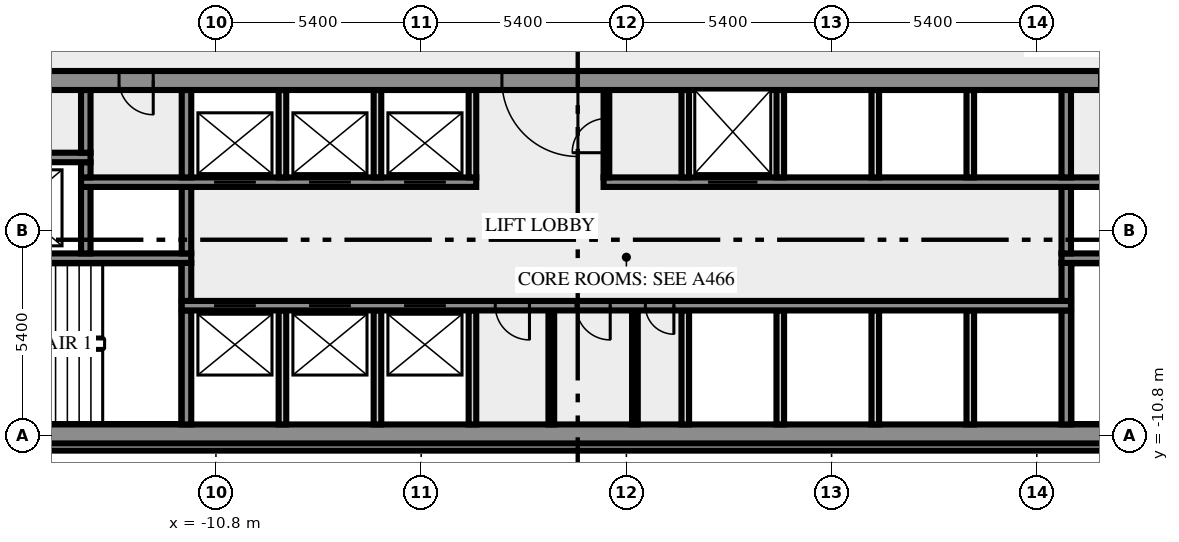
"""IFC4 building model, lengths in metres.
Left out: names, types, materials, properties, quantities, classifications, styles, units other than length and angle.
Written with IfcOpenShell. Run it as: python <this file> out.ifc"""

import sys

from ifc_helpers import new_model, si_unit, direction, frame, frame_2d, origin, place, context, subcontext, project, spatial, rectangle, extrude, element, fill, save


model = new_model("IFC4")
c1 = context("Model", 3, precision=1e-05, world=origin(), true_north=direction((0.0, 1.0)))
c2 = subcontext(c1, "Body", "Model", "MODEL_VIEW")
j1 = project(units=[si_unit("LENGTHUNIT", "METRE"), si_unit("PLANEANGLEUNIT", "RADIAN")], contexts=[c1])
p1 = place(None, origin())
s1 = spatial("IfcSite", under=j1, at=p1, CompositionType="ELEMENT")
p2 = place(p1, origin())
s2 = spatial("IfcBuilding", under=s1, at=p2, CompositionType="ELEMENT")
p3 = place(p2, frame((0.0, 0.0, 93.0)))
s3 = spatial("IfcBuildingStorey", under=s2, at=p3, CompositionType="ELEMENT", Elevation=93.0)
p4 = place(p3, frame((-17.444, -11.088, 0.0), z_axis=(0.0, 0.0, 1.0), x_axis=(1.0, 0.0, 0.0)))
e1 = element("IfcWall", 1, at=p4, inside=s3, PredefinedType="SOLIDWALL", context=c2, shape_type="SweptSolid", body=[
    extrude(rectangle(XDim=34.888, YDim=0.2, at=frame_2d((17.444, 0.0))), origin(), (0.0, 0.0, 1.0), 3.65),
])
p5 = place(p3, frame((-20.0, -10.75, 0.0), z_axis=(0.0, 0.0, 1.0), x_axis=(1.0, 0.0, 0.0)))
e2 = element("IfcWall", 2, at=p5, inside=s3, PredefinedType="SHEAR", context=c2, shape_type="SweptSolid", body=[
    extrude(rectangle(XDim=40.0, YDim=0.5, at=frame_2d((20.0, 0.0))), origin(), (0.0, 0.0, 1.0), 3.65),
])
p6 = place(p5, frame((0.8, 0.0, 1.0)))
e3 = element("IfcOpeningElement", 3, at=p6, cuts=e2, PredefinedType="OPENING", context=c2, shape_type="SweptSolid", body=[
    extrude(rectangle(XDim=1.2, YDim=1.2, at=frame_2d((0.6, 0.6))), frame((0.0, 0.26, 0.0), z_axis=(0.0, -1.0, 0.0), x_axis=(1.0, 0.0, 0.0)), (0.0, 0.0, 1.0), 0.52),
])
p7 = place(p5, frame((38.0, 0.0, 1.0)))
e4 = element("IfcOpeningElement", 4, at=p7, cuts=e2, PredefinedType="OPENING", context=c2, shape_type="SweptSolid", body=[
    extrude(rectangle(XDim=1.2, YDim=1.2, at=frame_2d((0.6, 0.6))), frame((0.0, 0.26, 0.0), z_axis=(0.0, -1.0, 0.0), x_axis=(1.0, 0.0, 0.0)), (0.0, 0.0, 1.0), 0.52),
])
p8 = place(p3, frame((-11.575, -10.5, 0.0), z_axis=(0.0, 0.0, 1.0), x_axis=(0.0, 1.0, 0.0)))
e5 = element("IfcWall", 5, at=p8, inside=s3, PredefinedType="SHEAR", context=c2, shape_type="SweptSolid", body=[
    extrude(rectangle(XDim=3.0, YDim=0.25, at=frame_2d((1.5, 0.0))), origin(), (0.0, 0.0, 1.0), 3.65),
])
for number, where, z_axis, x_axis in (
    (6, (-9.05, -10.5, 0.0), (0.0, 0.0, 1.0), (0.0, 1.0, 0.0)),
    (7, (-6.55, -10.5, 0.0), (0.0, 0.0, 1.0), (0.0, 1.0, 0.0)),
    (8, (-4.05, -10.5, 0.0), (0.0, 0.0, 1.0), (0.0, 1.0, 0.0)),
):
    element("IfcWall", number, at=place(p3, frame(where, z_axis=z_axis, x_axis=x_axis)), inside=s3, PredefinedType="SOLIDWALL", context=c2, shape_type="SweptSolid", body=[
        extrude(rectangle(XDim=3.0, YDim=0.2, at=frame_2d((1.5, 0.0))), origin(), (0.0, 0.0, 1.0), 3.65),
    ])
for number, where, z_axis, x_axis in (
    (9, (-1.975, -10.5, 0.0), (0.0, 0.0, 1.0), (0.0, 1.0, 0.0)),
    (10, (0.225, -10.5, 0.0), (0.0, 0.0, 1.0), (0.0, 1.0, 0.0)),
):
    element("IfcWall", number, at=place(p3, frame(where, z_axis=z_axis, x_axis=x_axis)), inside=s3, PredefinedType="PARTITIONING", context=c2, shape_type="SweptSolid", body=[
        extrude(rectangle(XDim=3.0, YDim=0.15, at=frame_2d((1.5, 0.0))), origin(), (0.0, 0.0, 1.0), 3.65),
    ])
for number, where, z_axis, x_axis in (
    (11, (1.55, -10.5, 0.0), (0.0, 0.0, 1.0), (0.0, 1.0, 0.0)),
    (12, (4.05, -10.5, 0.0), (0.0, 0.0, 1.0), (0.0, 1.0, 0.0)),
    (13, (6.55, -10.5, 0.0), (0.0, 0.0, 1.0), (0.0, 1.0, 0.0)),
    (14, (9.05, -10.5, 0.0), (0.0, 0.0, 1.0), (0.0, 1.0, 0.0)),
):
    element("IfcWall", number, at=place(p3, frame(where, z_axis=z_axis, x_axis=x_axis)), inside=s3, PredefinedType="SOLIDWALL", context=c2, shape_type="SweptSolid", body=[
        extrude(rectangle(XDim=3.0, YDim=0.2, at=frame_2d((1.5, 0.0))), origin(), (0.0, 0.0, 1.0), 3.65),
    ])
p9 = place(p3, frame((11.575, -10.5, 0.0), z_axis=(0.0, 0.0, 1.0), x_axis=(0.0, 1.0, 0.0)))
e15 = element("IfcWall", 15, at=p9, inside=s3, PredefinedType="SHEAR", context=c2, shape_type="SweptSolid", body=[
    extrude(rectangle(XDim=3.0, YDim=0.25, at=frame_2d((1.5, 0.0))), origin(), (0.0, 0.0, 1.0), 3.65),
])
p10 = place(p3, frame((11.7, -7.375, 0.0), z_axis=(0.0, 0.0, 1.0), x_axis=(-1.0, 0.0, 0.0)))
e16 = element("IfcWall", 16, at=p10, inside=s3, PredefinedType="SHEAR", context=c2, shape_type="SweptSolid", body=[
    extrude(rectangle(XDim=23.4, YDim=0.25, at=frame_2d((11.7, 0.0))), origin(), (0.0, 0.0, 1.0), 3.65),
])
p11 = place(p10, frame((21.45, 0.0, 0.0)))
e17 = element("IfcOpeningElement", 17, at=p11, cuts=e16, PredefinedType="OPENING", context=c2, shape_type="SweptSolid", body=[
    extrude(rectangle(XDim=1.1, YDim=2.1, at=frame_2d((0.55, 1.05))), frame((0.0, 0.135, 0.0), z_axis=(0.0, -1.0, 0.0), x_axis=(1.0, 0.0, 0.0)), (0.0, 0.0, 1.0), 0.27),
])
p12 = place(p10, frame((18.95, 0.0, 0.0)))
e18 = element("IfcOpeningElement", 18, at=p12, cuts=e16, PredefinedType="OPENING", context=c2, shape_type="SweptSolid", body=[
    extrude(rectangle(XDim=1.1, YDim=2.1, at=frame_2d((0.55, 1.05))), frame((0.0, 0.135, 0.0), z_axis=(0.0, -1.0, 0.0), x_axis=(1.0, 0.0, 0.0)), (0.0, 0.0, 1.0), 0.27),
])
p13 = place(p10, frame((16.45, 0.0, 0.0)))
e19 = element("IfcOpeningElement", 19, at=p13, cuts=e16, PredefinedType="OPENING", context=c2, shape_type="SweptSolid", body=[
    extrude(rectangle(XDim=1.1, YDim=2.1, at=frame_2d((0.55, 1.05))), frame((0.0, 0.135, 0.0), z_axis=(0.0, -1.0, 0.0), x_axis=(1.0, 0.0, 0.0)), (0.0, 0.0, 1.0), 0.27),
])
p14 = place(p10, frame((14.25, 0.0, 0.0)))
e20 = element("IfcOpeningElement", 20, at=p14, cuts=e16, PredefinedType="OPENING", context=c2, shape_type="SweptSolid", body=[
    extrude(rectangle(XDim=0.9, YDim=2.1, at=frame_2d((0.45, 1.05))), frame((0.0, 0.135, 0.0), z_axis=(0.0, -1.0, 0.0), x_axis=(1.0, 0.0, 0.0)), (0.0, 0.0, 1.0), 0.27),
])
p15 = place(p10, frame((12.125, 0.0, 0.0)))
e21 = element("IfcOpeningElement", 21, at=p15, cuts=e16, PredefinedType="OPENING", context=c2, shape_type="SweptSolid", body=[
    extrude(rectangle(XDim=0.9, YDim=2.1, at=frame_2d((0.45, 1.05))), frame((0.0, 0.135, 0.0), z_axis=(0.0, -1.0, 0.0), x_axis=(1.0, 0.0, 0.0)), (0.0, 0.0, 1.0), 0.27),
])
p16 = place(p10, frame((10.45, 0.0, 0.0)))
e22 = element("IfcOpeningElement", 22, at=p16, cuts=e16, PredefinedType="OPENING", context=c2, shape_type="SweptSolid", body=[
    extrude(rectangle(XDim=0.75, YDim=2.1, at=frame_2d((0.375, 1.05))), frame((0.0, 0.135, 0.0), z_axis=(0.0, -1.0, 0.0), x_axis=(1.0, 0.0, 0.0)), (0.0, 0.0, 1.0), 0.27),
])
for number, where, z_axis, x_axis in (
    (23, (-11.575, -7.25, 0.0), (0.0, 0.0, 1.0), (0.0, 1.0, 0.0)),
    (24, (11.575, -7.25, 0.0), (0.0, 0.0, 1.0), (0.0, 1.0, 0.0)),
):
    element("IfcWall", number, at=place(p3, frame(where, z_axis=z_axis, x_axis=x_axis)), inside=s3, PredefinedType="SHEAR", context=c2, shape_type="SweptSolid", body=[
        extrude(rectangle(XDim=1.0, YDim=0.25, at=frame_2d((0.5, 0.0))), origin(), (0.0, 0.0, 1.0), 3.65),
    ])
p17 = place(p3, frame((-11.45, -6.125, 0.0), z_axis=(0.0, 0.0, 1.0), x_axis=(-1.0, 0.0, 0.0)))
e25 = element("IfcWall", 25, at=p17, inside=s3, PredefinedType="SHEAR", context=c2, shape_type="SweptSolid", body=[
    extrude(rectangle(XDim=8.05, YDim=0.25, at=frame_2d((4.025, 0.0))), origin(), (0.0, 0.0, 1.0), 3.65),
])
p18 = place(p17, frame((6.2, 0.0, 0.0)))
e26 = element("IfcOpeningElement", 26, at=p18, cuts=e25, PredefinedType="OPENING", context=c2, shape_type="SweptSolid", body=[
    extrude(rectangle(XDim=1.8, YDim=2.1, at=frame_2d((0.9, 1.05))), frame((0.0, 0.135, 0.0), z_axis=(0.0, -1.0, 0.0), x_axis=(1.0, 0.0, 0.0)), (0.0, 0.0, 1.0), 0.27),
])
p19 = place(p3, frame((19.5, -6.125, 0.0), z_axis=(0.0, 0.0, 1.0), x_axis=(-1.0, 0.0, 0.0)))
e27 = element("IfcWall", 27, at=p19, inside=s3, PredefinedType="SHEAR", context=c2, shape_type="SweptSolid", body=[
    extrude(rectangle(XDim=8.05, YDim=0.25, at=frame_2d((4.025, 0.0))), origin(), (0.0, 0.0, 1.0), 3.65),
])
p20 = place(p19, frame((0.05, 0.0, 0.0)))
e28 = element("IfcOpeningElement", 28, at=p20, cuts=e27, PredefinedType="OPENING", context=c2, shape_type="SweptSolid", body=[
    extrude(rectangle(XDim=1.8, YDim=2.1, at=frame_2d((0.9, 1.05))), frame((0.0, 0.135, 0.0), z_axis=(0.0, -1.0, 0.0), x_axis=(1.0, 0.0, 0.0)), (0.0, 0.0, 1.0), 0.27),
])
for number, where, z_axis, x_axis in (
    (29, (-14.225, -6.0, 0.0), (0.0, 0.0, 1.0), (0.0, 1.0, 0.0)),
    (30, (-11.575, -6.0, 0.0), (0.0, 0.0, 1.0), (0.0, 1.0, 0.0)),
    (31, (11.575, -6.0, 0.0), (0.0, 0.0, 1.0), (0.0, 1.0, 0.0)),
):
    element("IfcWall", number, at=place(p3, frame(where, z_axis=z_axis, x_axis=x_axis)), inside=s3, PredefinedType="SHEAR", context=c2, shape_type="SweptSolid", body=[
        extrude(rectangle(XDim=1.75, YDim=0.25, at=frame_2d((0.875, 0.0))), origin(), (0.0, 0.0, 1.0), 3.65),
    ])
p21 = place(p3, frame((-14.35, -4.125, 0.0), z_axis=(0.0, 0.0, 1.0), x_axis=(1.0, 0.0, 0.0)))
e32 = element("IfcWall", 32, at=p21, inside=s3, PredefinedType="SHEAR", context=c2, shape_type="SweptSolid", body=[
    extrude(rectangle(XDim=10.4, YDim=0.25, at=frame_2d((5.2, 0.0))), origin(), (0.0, 0.0, 1.0), 3.65),
])
p22 = place(p21, frame((3.5, 0.0, 0.0)))
e33 = element("IfcOpeningElement", 33, at=p22, cuts=e32, PredefinedType="OPENING", context=c2, shape_type="SweptSolid", body=[
    extrude(rectangle(XDim=1.1, YDim=2.1, at=frame_2d((0.55, 1.05))), frame((0.0, 0.135, 0.0), z_axis=(0.0, -1.0, 0.0), x_axis=(1.0, 0.0, 0.0)), (0.0, 0.0, 1.0), 0.27),
])
p23 = place(p21, frame((6.0, 0.0, 0.0)))
e34 = element("IfcOpeningElement", 34, at=p23, cuts=e32, PredefinedType="OPENING", context=c2, shape_type="SweptSolid", body=[
    extrude(rectangle(XDim=1.1, YDim=2.1, at=frame_2d((0.55, 1.05))), frame((0.0, 0.135, 0.0), z_axis=(0.0, -1.0, 0.0), x_axis=(1.0, 0.0, 0.0)), (0.0, 0.0, 1.0), 0.27),
])
p24 = place(p21, frame((8.5, 0.0, 0.0)))
e35 = element("IfcOpeningElement", 35, at=p24, cuts=e32, PredefinedType="OPENING", context=c2, shape_type="SweptSolid", body=[
    extrude(rectangle(XDim=1.1, YDim=2.1, at=frame_2d((0.55, 1.05))), frame((0.0, 0.135, 0.0), z_axis=(0.0, -1.0, 0.0), x_axis=(1.0, 0.0, 0.0)), (0.0, 0.0, 1.0), 0.27),
])
p25 = place(p3, frame((-0.6, -4.125, 0.0), z_axis=(0.0, 0.0, 1.0), x_axis=(1.0, 0.0, 0.0)))
e36 = element("IfcWall", 36, at=p25, inside=s3, PredefinedType="SHEAR", context=c2, shape_type="SweptSolid", body=[
    extrude(rectangle(XDim=14.95, YDim=0.25, at=frame_2d((7.475, 0.0))), origin(), (0.0, 0.0, 1.0), 3.65),
])
p26 = place(p25, frame((2.75, 0.0, 0.0)))
e37 = element("IfcOpeningElement", 37, at=p26, cuts=e36, PredefinedType="OPENING", context=c2, shape_type="SweptSolid", body=[
    extrude(rectangle(XDim=1.3, YDim=2.1, at=frame_2d((0.65, 1.05))), frame((0.0, 0.135, 0.0), z_axis=(0.0, -1.0, 0.0), x_axis=(1.0, 0.0, 0.0)), (0.0, 0.0, 1.0), 0.27),
])
p27 = place(p3, frame((-14.225, -4.0, 0.0), z_axis=(0.0, 0.0, 1.0), x_axis=(0.0, 1.0, 0.0)))
e38 = element("IfcWall", 38, at=p27, inside=s3, PredefinedType="SHEAR", context=c2, shape_type="SweptSolid", body=[
    extrude(rectangle(XDim=0.4, YDim=0.25, at=frame_2d((0.2, 0.0))), origin(), (0.0, 0.0, 1.0), 3.65),
])
p28 = place(p3, frame((-11.575, -4.0, 0.0), z_axis=(0.0, 0.0, 1.0), x_axis=(0.0, 1.0, 0.0)))
e39 = element("IfcWall", 39, at=p28, inside=s3, PredefinedType="SHEAR", context=c2, shape_type="SweptSolid", body=[
    extrude(rectangle(XDim=2.3, YDim=0.25, at=frame_2d((1.15, 0.0))), origin(), (0.0, 0.0, 1.0), 3.65),
])
for number, where, z_axis, x_axis in (
    (40, (-9.05, -4.0, 0.0), (0.0, 0.0, 1.0), (0.0, 1.0, 0.0)),
    (41, (-6.55, -4.0, 0.0), (0.0, 0.0, 1.0), (0.0, 1.0, 0.0)),
    (42, (-4.05, -4.0, 0.0), (0.0, 0.0, 1.0), (0.0, 1.0, 0.0)),
):
    element("IfcWall", number, at=place(p3, frame(where, z_axis=z_axis, x_axis=x_axis)), inside=s3, PredefinedType="SOLIDWALL", context=c2, shape_type="SweptSolid", body=[
        extrude(rectangle(XDim=2.3, YDim=0.2, at=frame_2d((1.15, 0.0))), origin(), (0.0, 0.0, 1.0), 3.65),
    ])
p29 = place(p3, frame((-0.525, -4.0, 0.0), z_axis=(0.0, 0.0, 1.0), x_axis=(0.0, 1.0, 0.0)))
e43 = element("IfcWall", 43, at=p29, inside=s3, PredefinedType="PARTITIONING", context=c2, shape_type="SweptSolid", body=[
    extrude(rectangle(XDim=2.3, YDim=0.15, at=frame_2d((1.15, 0.0))), origin(), (0.0, 0.0, 1.0), 3.65),
])
p30 = place(p29, frame((0.65, 0.0, 0.0)))
e44 = element("IfcOpeningElement", 44, at=p30, cuts=e43, PredefinedType="OPENING", context=c2, shape_type="SweptSolid", body=[
    extrude(rectangle(XDim=0.9, YDim=2.1, at=frame_2d((0.45, 1.05))), frame((0.0, 0.085, 0.0), z_axis=(0.0, -1.0, 0.0), x_axis=(1.0, 0.0, 0.0)), (0.0, 0.0, 1.0), 0.17),
])
for number, where, z_axis, x_axis in (
    (45, (1.55, -4.0, 0.0), (0.0, 0.0, 1.0), (0.0, 1.0, 0.0)),
    (46, (4.05, -4.0, 0.0), (0.0, 0.0, 1.0), (0.0, 1.0, 0.0)),
    (47, (6.55, -4.0, 0.0), (0.0, 0.0, 1.0), (0.0, 1.0, 0.0)),
    (48, (9.05, -4.0, 0.0), (0.0, 0.0, 1.0), (0.0, 1.0, 0.0)),
):
    element("IfcWall", number, at=place(p3, frame(where, z_axis=z_axis, x_axis=x_axis)), inside=s3, PredefinedType="SOLIDWALL", context=c2, shape_type="SweptSolid", body=[
        extrude(rectangle(XDim=2.3, YDim=0.2, at=frame_2d((1.15, 0.0))), origin(), (0.0, 0.0, 1.0), 3.65),
    ])
p31 = place(p3, frame((11.575, -4.0, 0.0), z_axis=(0.0, 0.0, 1.0), x_axis=(0.0, 1.0, 0.0)))
e49 = element("IfcWall", 49, at=p31, inside=s3, PredefinedType="SHEAR", context=c2, shape_type="SweptSolid", body=[
    extrude(rectangle(XDim=2.3, YDim=0.25, at=frame_2d((1.15, 0.0))), origin(), (0.0, 0.0, 1.0), 3.65),
])
p32 = place(p3, frame((-17.35, -3.475, 0.0), z_axis=(0.0, 0.0, 1.0), x_axis=(1.0, 0.0, 0.0)))
e50 = element("IfcWall", 50, at=p32, inside=s3, PredefinedType="SHEAR", context=c2, shape_type="SweptSolid", body=[
    extrude(rectangle(XDim=3.25, YDim=0.25, at=frame_2d((1.625, 0.0))), origin(), (0.0, 0.0, 1.0), 3.65),
])
p33 = place(p3, frame((-14.225, -3.35, 0.0), z_axis=(0.0, 0.0, 1.0), x_axis=(0.0, 1.0, 0.0)))
e51 = element("IfcWall", 51, at=p33, inside=s3, PredefinedType="SHEAR", context=c2, shape_type="SweptSolid", body=[
    extrude(rectangle(XDim=1.65, YDim=0.25, at=frame_2d((0.825, 0.0))), origin(), (0.0, 0.0, 1.0), 3.65),
])
p34 = place(p3, frame((20.49, -1.45, 0.0), z_axis=(0.0, 0.0, 1.0), x_axis=(-1.0, 0.0, 0.0)))
e52 = element("IfcWall", 52, at=p34, inside=s3, PredefinedType="SHEAR", context=c2, shape_type="SweptSolid", body=[
    extrude(rectangle(XDim=40.98, YDim=0.5, at=frame_2d((20.49, 0.0))), origin(), (0.0, 0.0, 1.0), 3.65),
])
p35 = place(p34, frame((38.14, 0.0, 0.0)))
e53 = element("IfcOpeningElement", 53, at=p35, cuts=e52, PredefinedType="OPENING", context=c2, shape_type="SweptSolid", body=[
    extrude(rectangle(XDim=1.8, YDim=2.1, at=frame_2d((0.9, 1.05))), frame((0.0, 0.26, 0.0), z_axis=(0.0, -1.0, 0.0), x_axis=(1.0, 0.0, 0.0)), (0.0, 0.0, 1.0), 0.52),
])
p36 = place(p34, frame((35.89, 0.0, 0.0)))
e54 = element("IfcOpeningElement", 54, at=p36, cuts=e52, PredefinedType="OPENING", context=c2, shape_type="SweptSolid", body=[
    extrude(rectangle(XDim=0.9, YDim=2.1, at=frame_2d((0.45, 1.05))), frame((0.0, 0.26, 0.0), z_axis=(0.0, -1.0, 0.0), x_axis=(1.0, 0.0, 0.0)), (0.0, 0.0, 1.0), 0.52),
])
p37 = place(p34, frame((32.94, 0.0, 0.0)))
e55 = element("IfcOpeningElement", 55, at=p37, cuts=e52, PredefinedType="OPENING", context=c2, shape_type="SweptSolid", body=[
    extrude(rectangle(XDim=0.9, YDim=2.1, at=frame_2d((0.45, 1.05))), frame((0.0, 0.26, 0.0), z_axis=(0.0, -1.0, 0.0), x_axis=(1.0, 0.0, 0.0)), (0.0, 0.0, 1.0), 0.52),
])
p38 = place(p34, frame((21.765, 0.0, 0.0)))
e56 = element("IfcOpeningElement", 56, at=p38, cuts=e52, PredefinedType="OPENING", context=c2, shape_type="SweptSolid", body=[
    extrude(rectangle(XDim=2.0, YDim=2.1, at=frame_2d((1.0, 1.05))), frame((0.0, 0.26, 0.0), z_axis=(0.0, -1.0, 0.0), x_axis=(1.0, 0.0, 0.0)), (0.0, 0.0, 1.0), 0.52),
])
p39 = place(p34, frame((7.14, 0.0, 0.0)))
e57 = element("IfcOpeningElement", 57, at=p39, cuts=e52, PredefinedType="OPENING", context=c2, shape_type="SweptSolid", body=[
    extrude(rectangle(XDim=0.9, YDim=2.1, at=frame_2d((0.45, 1.05))), frame((0.0, 0.26, 0.0), z_axis=(0.0, -1.0, 0.0), x_axis=(1.0, 0.0, 0.0)), (0.0, 0.0, 1.0), 0.52),
])
p40 = place(p34, frame((5.028, 0.0, 0.0)))
e58 = element("IfcOpeningElement", 58, at=p40, cuts=e52, PredefinedType="OPENING", context=c2, shape_type="SweptSolid", body=[
    extrude(rectangle(XDim=0.8, YDim=2.1, at=frame_2d((0.4, 1.05))), frame((0.0, 0.26, 0.0), z_axis=(0.0, -1.0, 0.0), x_axis=(1.0, 0.0, 0.0)), (0.0, 0.0, 1.0), 0.52),
])
p41 = place(p34, frame((3.452, 0.0, 0.0)))
e59 = element("IfcOpeningElement", 59, at=p41, cuts=e52, PredefinedType="OPENING", context=c2, shape_type="SweptSolid", body=[
    extrude(rectangle(XDim=0.8, YDim=2.1, at=frame_2d((0.4, 1.05))), frame((0.0, 0.26, 0.0), z_axis=(0.0, -1.0, 0.0), x_axis=(1.0, 0.0, 0.0)), (0.0, 0.0, 1.0), 0.52),
])
p42 = place(p34, frame((1.04, 0.0, 0.0)))
e60 = element("IfcOpeningElement", 60, at=p42, cuts=e52, PredefinedType="OPENING", context=c2, shape_type="SweptSolid", body=[
    extrude(rectangle(XDim=1.8, YDim=2.1, at=frame_2d((0.9, 1.05))), frame((0.0, 0.26, 0.0), z_axis=(0.0, -1.0, 0.0), x_axis=(1.0, 0.0, 0.0)), (0.0, 0.0, 1.0), 0.52),
])
p43 = place(p11, origin())
e61 = element("IfcDoor", 61, at=p43, inside=s3, OperationType="DOUBLE_DOOR_SLIDING", PredefinedType="DOOR", context=c2, shape_type="SweptSolid", body=[
    extrude(rectangle(XDim=1.1, YDim=2.1, at=frame_2d((0.55, 1.05))), frame((0.0, 0.025, 0.0), z_axis=(0.0, -1.0, 0.0), x_axis=(1.0, 0.0, 0.0)), (0.0, 0.0, 1.0), 0.05),
])
fill(e17, e61)
p44 = place(p12, origin())
e62 = element("IfcDoor", 62, at=p44, inside=s3, OperationType="DOUBLE_DOOR_SLIDING", PredefinedType="DOOR", context=c2, shape_type="SweptSolid", body=[
    extrude(rectangle(XDim=1.1, YDim=2.1, at=frame_2d((0.55, 1.05))), frame((0.0, 0.025, 0.0), z_axis=(0.0, -1.0, 0.0), x_axis=(1.0, 0.0, 0.0)), (0.0, 0.0, 1.0), 0.05),
])
fill(e18, e62)
p45 = place(p13, origin())
e63 = element("IfcDoor", 63, at=p45, inside=s3, OperationType="DOUBLE_DOOR_SLIDING", PredefinedType="DOOR", context=c2, shape_type="SweptSolid", body=[
    extrude(rectangle(XDim=1.1, YDim=2.1, at=frame_2d((0.55, 1.05))), frame((0.0, 0.025, 0.0), z_axis=(0.0, -1.0, 0.0), x_axis=(1.0, 0.0, 0.0)), (0.0, 0.0, 1.0), 0.05),
])
fill(e19, e63)
p46 = place(p14, origin())
e64 = element("IfcDoor", 64, at=p46, inside=s3, OperationType="SINGLE_SWING_RIGHT", PredefinedType="DOOR", context=c2, shape_type="SweptSolid", body=[
    extrude(rectangle(XDim=0.9, YDim=2.1, at=frame_2d((0.45, 1.05))), frame((0.0, 0.025, 0.0), z_axis=(0.0, -1.0, 0.0), x_axis=(1.0, 0.0, 0.0)), (0.0, 0.0, 1.0), 0.05),
])
fill(e20, e64)
p47 = place(p15, origin())
e65 = element("IfcDoor", 65, at=p47, inside=s3, OperationType="SINGLE_SWING_RIGHT", PredefinedType="DOOR", context=c2, shape_type="SweptSolid", body=[
    extrude(rectangle(XDim=0.9, YDim=2.1, at=frame_2d((0.45, 1.05))), frame((0.0, 0.025, 0.0), z_axis=(0.0, -1.0, 0.0), x_axis=(1.0, 0.0, 0.0)), (0.0, 0.0, 1.0), 0.05),
])
fill(e21, e65)
p48 = place(p16, origin())
e66 = element("IfcDoor", 66, at=p48, inside=s3, OperationType="SINGLE_SWING_LEFT", PredefinedType="DOOR", context=c2, shape_type="SweptSolid", body=[
    extrude(rectangle(XDim=0.75, YDim=2.1, at=frame_2d((0.375, 1.05))), frame((0.0, 0.025, 0.0), z_axis=(0.0, -1.0, 0.0), x_axis=(1.0, 0.0, 0.0)), (0.0, 0.0, 1.0), 0.05),
])
fill(e22, e66)
p49 = place(p22, origin())
e67 = element("IfcDoor", 67, at=p49, inside=s3, OperationType="DOUBLE_DOOR_SLIDING", PredefinedType="DOOR", context=c2, shape_type="SweptSolid", body=[
    extrude(rectangle(XDim=1.1, YDim=2.1, at=frame_2d((0.55, 1.05))), frame((0.0, 0.025, 0.0), z_axis=(0.0, -1.0, 0.0), x_axis=(1.0, 0.0, 0.0)), (0.0, 0.0, 1.0), 0.05),
])
fill(e33, e67)
p50 = place(p23, origin())
e68 = element("IfcDoor", 68, at=p50, inside=s3, OperationType="DOUBLE_DOOR_SLIDING", PredefinedType="DOOR", context=c2, shape_type="SweptSolid", body=[
    extrude(rectangle(XDim=1.1, YDim=2.1, at=frame_2d((0.55, 1.05))), frame((0.0, 0.025, 0.0), z_axis=(0.0, -1.0, 0.0), x_axis=(1.0, 0.0, 0.0)), (0.0, 0.0, 1.0), 0.05),
])
fill(e34, e68)
p51 = place(p24, origin())
e69 = element("IfcDoor", 69, at=p51, inside=s3, OperationType="DOUBLE_DOOR_SLIDING", PredefinedType="DOOR", context=c2, shape_type="SweptSolid", body=[
    extrude(rectangle(XDim=1.1, YDim=2.1, at=frame_2d((0.55, 1.05))), frame((0.0, 0.025, 0.0), z_axis=(0.0, -1.0, 0.0), x_axis=(1.0, 0.0, 0.0)), (0.0, 0.0, 1.0), 0.05),
])
fill(e35, e69)
p52 = place(p26, origin())
e70 = element("IfcDoor", 70, at=p52, inside=s3, OperationType="DOUBLE_DOOR_SLIDING", PredefinedType="DOOR", context=c2, shape_type="SweptSolid", body=[
    extrude(rectangle(XDim=1.3, YDim=2.1, at=frame_2d((0.65, 1.05))), frame((0.0, 0.025, 0.0), z_axis=(0.0, -1.0, 0.0), x_axis=(1.0, 0.0, 0.0)), (0.0, 0.0, 1.0), 0.05),
])
fill(e37, e70)
p53 = place(p30, origin())
e71 = element("IfcDoor", 71, at=p53, inside=s3, OperationType="SINGLE_SWING_LEFT", PredefinedType="DOOR", context=c2, shape_type="SweptSolid", body=[
    extrude(rectangle(XDim=0.9, YDim=2.1, at=frame_2d((0.45, 1.05))), frame((0.0, 0.025, 0.0), z_axis=(0.0, -1.0, 0.0), x_axis=(1.0, 0.0, 0.0)), (0.0, 0.0, 1.0), 0.05),
])
fill(e44, e71)
p54 = place(p37, origin())
e72 = element("IfcDoor", 72, at=p54, inside=s3, OperationType="SINGLE_SWING_RIGHT", PredefinedType="DOOR", context=c2, shape_type="SweptSolid", body=[
    extrude(rectangle(XDim=0.9, YDim=2.1, at=frame_2d((0.45, 1.05))), frame((0.0, 0.025, 0.0), z_axis=(0.0, -1.0, 0.0), x_axis=(1.0, 0.0, 0.0)), (0.0, 0.0, 1.0), 0.05),
])
fill(e55, e72)
p55 = place(p38, origin())
e73 = element("IfcDoor", 73, at=p55, inside=s3, OperationType="DOUBLE_DOOR_SINGLE_SWING", PredefinedType="DOOR", context=c2, shape_type="SweptSolid", body=[
    extrude(rectangle(XDim=2.0, YDim=2.1, at=frame_2d((1.0, 1.05))), frame((0.0, 0.025, 0.0), z_axis=(0.0, -1.0, 0.0), x_axis=(1.0, 0.0, 0.0)), (0.0, 0.0, 1.0), 0.05),
])
fill(e56, e73)
save(model, sys.argv[1])
